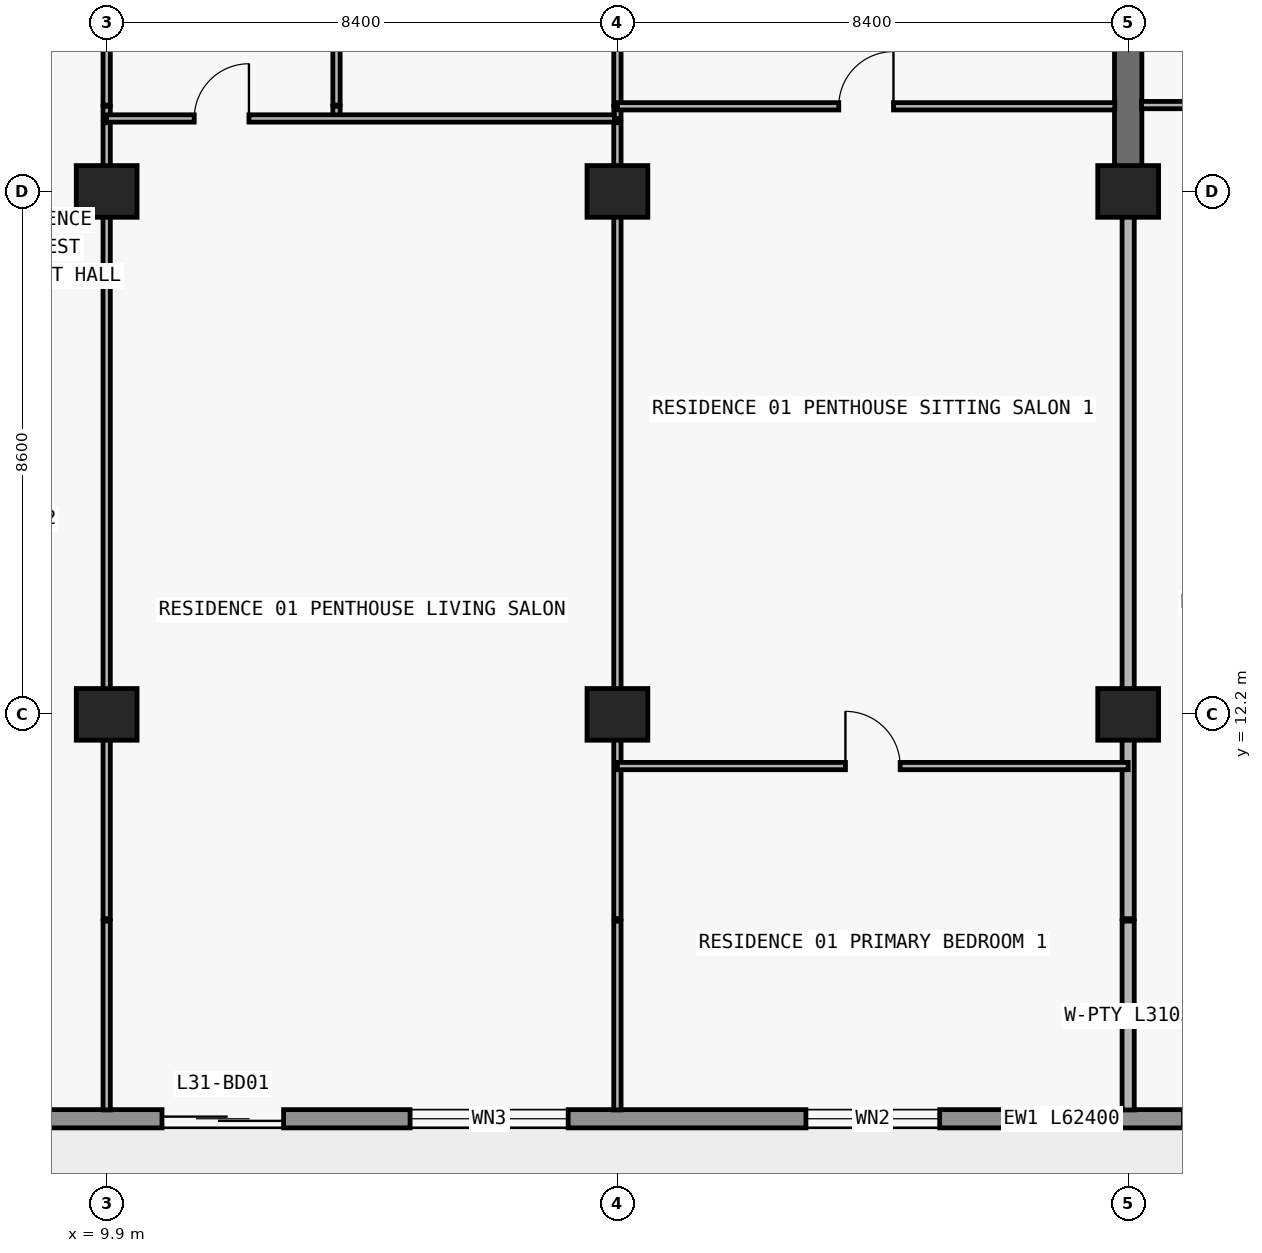
"""IFC4 building model, lengths in metres.
Left out: names, types, materials, properties, quantities, classifications, styles, units other than length and angle.
Written with IfcOpenShell. Run it as: python <this file> out.ifc"""

import sys

from ifc_helpers import new_model, si_unit, direction, frame, frame_2d, origin, origin_2d, place, context, subcontext, project, spatial, rectangle, extrude, element, fill, save


model = new_model("IFC4")
c1 = context("Model", 3, precision=1e-05, world=origin(), true_north=direction((0.0, 1.0)))
c2 = subcontext(c1, "Body", "Model", "MODEL_VIEW")
j1 = project(units=[si_unit("LENGTHUNIT", "METRE"), si_unit("PLANEANGLEUNIT", "RADIAN")], contexts=[c1])
p1 = place(None, origin())
s1 = spatial("IfcSite", under=j1, at=p1, CompositionType="ELEMENT")
p2 = place(p1, origin())
s2 = spatial("IfcBuilding", under=s1, at=p2, CompositionType="ELEMENT")
p3 = place(p2, frame((0.0, 0.0, 115.8)))
s3 = spatial("IfcBuildingStorey", under=s2, at=p3, CompositionType="ELEMENT", Elevation=115.8)
for number, where, z_axis, x_axis in (
    (1, (9.9, 12.2, 0.0), (0.0, 0.0, 1.0), (1.0, 0.0, 0.0)),
    (2, (18.3, 12.2, 0.0), (0.0, 0.0, 1.0), (1.0, 0.0, 0.0)),
    (3, (26.7, 12.2, 0.0), (0.0, 0.0, 1.0), (1.0, 0.0, 0.0)),
    (4, (9.9, 20.8, 0.0), (0.0, 0.0, 1.0), (1.0, 0.0, 0.0)),
    (5, (18.3, 20.8, 0.0), (0.0, 0.0, 1.0), (1.0, 0.0, 0.0)),
    (6, (26.7, 20.8, 0.0), (0.0, 0.0, 1.0), (1.0, 0.0, 0.0)),
):
    element("IfcColumn", number, at=place(p3, frame(where, z_axis=z_axis, x_axis=x_axis)), inside=s3, PredefinedType="COLUMN", context=c2, shape_type="SweptSolid", body=[
        extrude(rectangle(XDim=1.0, YDim=0.85, at=origin_2d()), origin(), (0.0, 0.0, 1.0), 3.05),
    ])
p4 = place(p3, frame((26.7, 20.8, 0.0), z_axis=(0.0, 0.0, 1.0), x_axis=(0.0, 1.0, 0.0)))
e7 = element("IfcWall", 7, at=p4, inside=s3, PredefinedType="SHEAR", context=c2, shape_type="SweptSolid", body=[
    extrude(rectangle(XDim=8.6, YDim=0.45, at=frame_2d((4.3, 0.0))), origin(), (0.0, 0.0, 1.0), 3.05),
])
p5 = place(p3, frame((70.1, 5.55, 0.0), z_axis=(0.0, 0.0, 1.0), x_axis=(-1.0, 0.0, 0.0)))
e8 = element("IfcWall", 8, at=p5, inside=s3, PredefinedType="STANDARD", context=c2, shape_type="SweptSolid", body=[
    extrude(rectangle(XDim=62.4, YDim=0.3, at=frame_2d((31.2, 0.0))), origin(), (0.0, 0.0, 1.0), 3.05),
])
p6 = place(p5, frame((57.29, 0.0, 0.0)))
e9 = element("IfcOpeningElement", 9, at=p6, cuts=e8, PredefinedType="OPENING", context=c2, shape_type="SweptSolid", body=[
    extrude(rectangle(XDim=2.0, YDim=2.3, at=frame_2d((1.0, 1.15))), frame((0.0, 0.16, 0.0), z_axis=(0.0, -1.0, 0.0), x_axis=(1.0, 0.0, 0.0)), (0.0, 0.0, 1.0), 0.32),
])
p7 = place(p5, frame((52.61, 0.0, 0.65)))
e10 = element("IfcOpeningElement", 10, at=p7, cuts=e8, PredefinedType="OPENING", context=c2, shape_type="SweptSolid", body=[
    extrude(rectangle(XDim=2.6, YDim=1.85, at=frame_2d((1.3, 0.925))), frame((0.0, 0.16, 0.0), z_axis=(0.0, -1.0, 0.0), x_axis=(1.0, 0.0, 0.0)), (0.0, 0.0, 1.0), 0.32),
])
p8 = place(p5, frame((46.5, 0.0, 0.85)))
e11 = element("IfcOpeningElement", 11, at=p8, cuts=e8, PredefinedType="OPENING", context=c2, shape_type="SweptSolid", body=[
    extrude(rectangle(XDim=2.2, YDim=1.55, at=frame_2d((1.1, 0.775))), frame((0.0, 0.16, 0.0), z_axis=(0.0, -1.0, 0.0), x_axis=(1.0, 0.0, 0.0)), (0.0, 0.0, 1.0), 0.32),
])
p9 = place(p5, frame((40.49, 0.0, 0.0)))
e12 = element("IfcOpeningElement", 12, at=p9, cuts=e8, PredefinedType="OPENING", context=c2, shape_type="SweptSolid", body=[
    extrude(rectangle(XDim=2.0, YDim=2.3, at=frame_2d((1.0, 1.15))), frame((0.0, 0.16, 0.0), z_axis=(0.0, -1.0, 0.0), x_axis=(1.0, 0.0, 0.0)), (0.0, 0.0, 1.0), 0.32),
])
p10 = place(p5, frame((35.81, 0.0, 0.65)))
e13 = element("IfcOpeningElement", 13, at=p10, cuts=e8, PredefinedType="OPENING", context=c2, shape_type="SweptSolid", body=[
    extrude(rectangle(XDim=2.6, YDim=1.85, at=frame_2d((1.3, 0.925))), frame((0.0, 0.16, 0.0), z_axis=(0.0, -1.0, 0.0), x_axis=(1.0, 0.0, 0.0)), (0.0, 0.0, 1.0), 0.32),
])
p11 = place(p5, frame((30.1, 0.0, 0.85)))
e14 = element("IfcOpeningElement", 14, at=p11, cuts=e8, PredefinedType="OPENING", context=c2, shape_type="SweptSolid", body=[
    extrude(rectangle(XDim=2.2, YDim=1.55, at=frame_2d((1.1, 0.775))), frame((0.0, 0.16, 0.0), z_axis=(0.0, -1.0, 0.0), x_axis=(1.0, 0.0, 0.0)), (0.0, 0.0, 1.0), 0.32),
])
p12 = place(p5, frame((24.426, 0.0, 0.0)))
e15 = element("IfcOpeningElement", 15, at=p12, cuts=e8, PredefinedType="OPENING", context=c2, shape_type="SweptSolid", body=[
    extrude(rectangle(XDim=2.0, YDim=2.3, at=frame_2d((1.0, 1.15))), frame((0.0, 0.16, 0.0), z_axis=(0.0, -1.0, 0.0), x_axis=(1.0, 0.0, 0.0)), (0.0, 0.0, 1.0), 0.32),
])
p13 = place(p5, frame((20.126, 0.0, 0.85)))
e16 = element("IfcOpeningElement", 16, at=p13, cuts=e8, PredefinedType="OPENING", context=c2, shape_type="SweptSolid", body=[
    extrude(rectangle(XDim=2.2, YDim=1.55, at=frame_2d((1.1, 0.775))), frame((0.0, 0.16, 0.0), z_axis=(0.0, -1.0, 0.0), x_axis=(1.0, 0.0, 0.0)), (0.0, 0.0, 1.0), 0.32),
])
p14 = place(p5, frame((15.69, 0.0, 0.0)))
e17 = element("IfcOpeningElement", 17, at=p14, cuts=e8, PredefinedType="OPENING", context=c2, shape_type="SweptSolid", body=[
    extrude(rectangle(XDim=2.0, YDim=2.3, at=frame_2d((1.0, 1.15))), frame((0.0, 0.16, 0.0), z_axis=(0.0, -1.0, 0.0), x_axis=(1.0, 0.0, 0.0)), (0.0, 0.0, 1.0), 0.32),
])
p15 = place(p5, frame((11.59, 0.0, 0.85)))
e18 = element("IfcOpeningElement", 18, at=p15, cuts=e8, PredefinedType="OPENING", context=c2, shape_type="SweptSolid", body=[
    extrude(rectangle(XDim=1.8, YDim=1.55, at=frame_2d((0.9, 0.775))), frame((0.0, 0.16, 0.0), z_axis=(0.0, -1.0, 0.0), x_axis=(1.0, 0.0, 0.0)), (0.0, 0.0, 1.0), 0.32),
])
p16 = place(p5, frame((7.626, 0.0, 0.0)))
e19 = element("IfcOpeningElement", 19, at=p16, cuts=e8, PredefinedType="OPENING", context=c2, shape_type="SweptSolid", body=[
    extrude(rectangle(XDim=2.0, YDim=2.3, at=frame_2d((1.0, 1.15))), frame((0.0, 0.16, 0.0), z_axis=(0.0, -1.0, 0.0), x_axis=(1.0, 0.0, 0.0)), (0.0, 0.0, 1.0), 0.32),
])
p17 = place(p5, frame((3.326, 0.0, 0.85)))
e20 = element("IfcOpeningElement", 20, at=p17, cuts=e8, PredefinedType="OPENING", context=c2, shape_type="SweptSolid", body=[
    extrude(rectangle(XDim=2.2, YDim=1.55, at=frame_2d((1.1, 0.775))), frame((0.0, 0.16, 0.0), z_axis=(0.0, -1.0, 0.0), x_axis=(1.0, 0.0, 0.0)), (0.0, 0.0, 1.0), 0.32),
])
p18 = place(p3, frame((9.9, 5.695, 0.0), z_axis=(0.0, 0.0, 1.0), x_axis=(0.0, 1.0, 0.0)))
e21 = element("IfcWall", 21, at=p18, inside=s3, PredefinedType="PARTITIONING", context=c2, shape_type="SweptSolid", body=[
    extrude(rectangle(XDim=3.105, YDim=0.12, at=frame_2d((1.552, 0.0))), origin(), (0.0, 0.0, 1.0), 3.05),
])
p19 = place(p3, frame((9.9, 8.84, 0.0), z_axis=(0.0, 0.0, 1.0), x_axis=(0.0, 1.0, 0.0)))
e22 = element("IfcWall", 22, at=p19, inside=s3, PredefinedType="PARTITIONING", context=c2, shape_type="SweptSolid", body=[
    extrude(rectangle(XDim=13.09, YDim=0.12, at=frame_2d((6.545, 0.0))), origin(), (0.0, 0.0, 1.0), 2.174),
])
p20 = place(p3, frame((9.9, 22.0, 0.0), z_axis=(0.0, 0.0, 1.0), x_axis=(0.0, 1.0, 0.0)))
e23 = element("IfcWall", 23, at=p20, inside=s3, PredefinedType="PARTITIONING", context=c2, shape_type="SweptSolid", body=[
    extrude(rectangle(XDim=0.2, YDim=0.12, at=frame_2d((0.1, 0.0))), origin(), (0.0, 0.0, 1.0), 2.174),
])
p21 = place(p3, frame((9.9, 22.22, 0.0), z_axis=(0.0, 0.0, 1.0), x_axis=(0.0, 1.0, 0.0)))
e24 = element("IfcWall", 24, at=p21, inside=s3, PredefinedType="PARTITIONING", context=c2, shape_type="SweptSolid", body=[
    extrude(rectangle(XDim=4.38, YDim=0.12, at=frame_2d((2.19, 0.0))), origin(), (0.0, 0.0, 1.0), 2.174),
])
p22 = place(p21, frame((1.74, 0.0, 0.0)))
e25 = element("IfcOpeningElement", 25, at=p22, cuts=e24, PredefinedType="OPENING", context=c2, shape_type="SweptSolid", body=[
    extrude(rectangle(XDim=0.9, YDim=2.124, at=frame_2d((0.45, 1.062))), frame((0.0, 0.07, 0.0), z_axis=(0.0, -1.0, 0.0), x_axis=(1.0, 0.0, 0.0)), (0.0, 0.0, 1.0), 0.14),
])
p23 = place(p3, frame((13.68, 22.0, 0.0), z_axis=(0.0, 0.0, 1.0), x_axis=(0.0, 1.0, 0.0)))
e26 = element("IfcWall", 26, at=p23, inside=s3, PredefinedType="PARTITIONING", context=c2, shape_type="SweptSolid", body=[
    extrude(rectangle(XDim=0.2, YDim=0.12, at=frame_2d((0.1, 0.0))), origin(), (0.0, 0.0, 1.0), 3.05),
])
p24 = place(p3, frame((13.68, 22.22, 0.0), z_axis=(0.0, 0.0, 1.0), x_axis=(0.0, 1.0, 0.0)))
e27 = element("IfcWall", 27, at=p24, inside=s3, PredefinedType="PARTITIONING", context=c2, shape_type="SweptSolid", body=[
    extrude(rectangle(XDim=4.38, YDim=0.12, at=frame_2d((2.19, 0.0))), origin(), (0.0, 0.0, 1.0), 3.05),
])
p25 = place(p24, frame((1.74, 0.0, 0.0)))
e28 = element("IfcOpeningElement", 28, at=p25, cuts=e27, PredefinedType="OPENING", context=c2, shape_type="SweptSolid", body=[
    extrude(rectangle(XDim=0.9, YDim=2.15, at=frame_2d((0.45, 1.075))), frame((0.0, 0.07, 0.0), z_axis=(0.0, -1.0, 0.0), x_axis=(1.0, 0.0, 0.0)), (0.0, 0.0, 1.0), 0.14),
])
p26 = place(p3, frame((18.3, 5.695, 0.0), z_axis=(0.0, 0.0, 1.0), x_axis=(0.0, 1.0, 0.0)))
e29 = element("IfcWall", 29, at=p26, inside=s3, PredefinedType="PARTITIONING", context=c2, shape_type="SweptSolid", body=[
    extrude(rectangle(XDim=3.105, YDim=0.12, at=frame_2d((1.552, 0.0))), origin(), (0.0, 0.0, 1.0), 3.05),
])
p27 = place(p3, frame((18.3, 8.84, 0.0), z_axis=(0.0, 0.0, 1.0), x_axis=(0.0, 1.0, 0.0)))
e30 = element("IfcWall", 30, at=p27, inside=s3, PredefinedType="PARTITIONING", context=c2, shape_type="SweptSolid", body=[
    extrude(rectangle(XDim=13.09, YDim=0.12, at=frame_2d((6.545, 0.0))), origin(), (0.0, 0.0, 1.0), 2.174),
])
p28 = place(p3, frame((18.3, 22.0, 0.0), z_axis=(0.0, 0.0, 1.0), x_axis=(0.0, 1.0, 0.0)))
e31 = element("IfcWall", 31, at=p28, inside=s3, PredefinedType="PARTITIONING", context=c2, shape_type="SweptSolid", body=[
    extrude(rectangle(XDim=0.2, YDim=0.12, at=frame_2d((0.1, 0.0))), origin(), (0.0, 0.0, 1.0), 2.174),
])
p29 = place(p3, frame((18.3, 22.22, 0.0), z_axis=(0.0, 0.0, 1.0), x_axis=(0.0, 1.0, 0.0)))
e32 = element("IfcWall", 32, at=p29, inside=s3, PredefinedType="PARTITIONING", context=c2, shape_type="SweptSolid", body=[
    extrude(rectangle(XDim=4.38, YDim=0.12, at=frame_2d((2.19, 0.0))), origin(), (0.0, 0.0, 1.0), 2.174),
])
p30 = place(p29, frame((1.74, 0.0, 0.0)))
e33 = element("IfcOpeningElement", 33, at=p30, cuts=e32, PredefinedType="OPENING", context=c2, shape_type="SweptSolid", body=[
    extrude(rectangle(XDim=0.9, YDim=2.124, at=frame_2d((0.45, 1.062))), frame((0.0, 0.07, 0.0), z_axis=(0.0, -1.0, 0.0), x_axis=(1.0, 0.0, 0.0)), (0.0, 0.0, 1.0), 0.14),
])
p31 = place(p3, frame((26.7, 5.695, 0.0), z_axis=(0.0, 0.0, 1.0), x_axis=(0.0, 1.0, 0.0)))
e34 = element("IfcWall", 34, at=p31, inside=s3, PredefinedType="PARTITIONING", context=c2, shape_type="SweptSolid", body=[
    extrude(rectangle(XDim=3.105, YDim=0.2, at=frame_2d((1.552, 0.0))), origin(), (0.0, 0.0, 1.0), 3.05),
])
p32 = place(p3, frame((26.7, 8.84, 0.0), z_axis=(0.0, 0.0, 1.0), x_axis=(0.0, 1.0, 0.0)))
e35 = element("IfcWall", 35, at=p32, inside=s3, PredefinedType="PARTITIONING", context=c2, shape_type="SweptSolid", body=[
    extrude(rectangle(XDim=11.955, YDim=0.2, at=frame_2d((5.978, 0.0))), origin(), (0.0, 0.0, 1.0), 2.174),
])
p33 = place(p3, frame((18.3, 11.35, 0.0), z_axis=(0.0, 0.0, 1.0), x_axis=(1.0, 0.0, 0.0)))
e36 = element("IfcWall", 36, at=p33, inside=s3, PredefinedType="PARTITIONING", context=c2, shape_type="SweptSolid", body=[
    extrude(rectangle(XDim=8.4, YDim=0.12, at=frame_2d((4.2, 0.0))), origin(), (0.0, 0.0, 1.0), 3.05),
])
p34 = place(p33, frame((3.75, 0.0, 0.0)))
e37 = element("IfcOpeningElement", 37, at=p34, cuts=e36, PredefinedType="OPENING", context=c2, shape_type="SweptSolid", body=[
    extrude(rectangle(XDim=0.9, YDim=2.15, at=frame_2d((0.45, 1.075))), frame((0.0, 0.07, 0.0), z_axis=(0.0, -1.0, 0.0), x_axis=(1.0, 0.0, 0.0)), (0.0, 0.0, 1.0), 0.14),
])
p35 = place(p3, frame((9.9, 22.0, 0.0), z_axis=(0.0, 0.0, 1.0), x_axis=(1.0, 0.0, 0.0)))
e38 = element("IfcWall", 38, at=p35, inside=s3, PredefinedType="PARTITIONING", context=c2, shape_type="SweptSolid", body=[
    extrude(rectangle(XDim=8.35, YDim=0.12, at=frame_2d((4.175, 0.0))), origin(), (0.0, 0.0, 1.0), 3.05),
])
p36 = place(p35, frame((1.44, 0.0, 0.0)))
e39 = element("IfcOpeningElement", 39, at=p36, cuts=e38, PredefinedType="OPENING", context=c2, shape_type="SweptSolid", body=[
    extrude(rectangle(XDim=0.9, YDim=2.15, at=frame_2d((0.45, 1.075))), frame((0.0, 0.07, 0.0), z_axis=(0.0, -1.0, 0.0), x_axis=(1.0, 0.0, 0.0)), (0.0, 0.0, 1.0), 0.14),
])
p37 = place(p3, frame((18.3, 22.2, 0.0), z_axis=(0.0, 0.0, 1.0), x_axis=(1.0, 0.0, 0.0)))
e40 = element("IfcWall", 40, at=p37, inside=s3, PredefinedType="PARTITIONING", context=c2, shape_type="SweptSolid", body=[
    extrude(rectangle(XDim=8.18, YDim=0.12, at=frame_2d((4.09, 0.0))), origin(), (0.0, 0.0, 1.0), 3.05),
])
p38 = place(p37, frame((3.64, 0.0, 0.0)))
e41 = element("IfcOpeningElement", 41, at=p38, cuts=e40, PredefinedType="OPENING", context=c2, shape_type="SweptSolid", body=[
    extrude(rectangle(XDim=0.9, YDim=2.15, at=frame_2d((0.45, 1.075))), frame((0.0, 0.07, 0.0), z_axis=(0.0, -1.0, 0.0), x_axis=(1.0, 0.0, 0.0)), (0.0, 0.0, 1.0), 0.14),
])
p39 = place(p3, frame((26.92, 22.22, 0.0), z_axis=(0.0, 0.0, 1.0), x_axis=(1.0, 0.0, 0.0)))
e42 = element("IfcWall", 42, at=p39, inside=s3, PredefinedType="PARTITIONING", context=c2, shape_type="SweptSolid", body=[
    extrude(rectangle(XDim=8.18, YDim=0.12, at=frame_2d((4.09, 0.0))), origin(), (0.0, 0.0, 1.0), 3.05),
])
p40 = place(p39, frame((1.204, 0.0, 0.0)))
e43 = element("IfcOpeningElement", 43, at=p40, cuts=e42, PredefinedType="OPENING", context=c2, shape_type="SweptSolid", body=[
    extrude(rectangle(XDim=0.9, YDim=2.15, at=frame_2d((0.45, 1.075))), frame((0.0, 0.07, 0.0), z_axis=(0.0, -1.0, 0.0), x_axis=(1.0, 0.0, 0.0)), (0.0, 0.0, 1.0), 0.14),
])
p41 = place(p6, origin())
e44 = element("IfcDoor", 44, at=p41, inside=s3, OperationType="DOUBLE_DOOR_SLIDING", PredefinedType="DOOR", context=c2, shape_type="SweptSolid", body=[
    extrude(rectangle(XDim=2.0, YDim=2.3, at=frame_2d((1.0, 1.15))), frame((0.0, 0.025, 0.0), z_axis=(0.0, -1.0, 0.0), x_axis=(1.0, 0.0, 0.0)), (0.0, 0.0, 1.0), 0.05),
])
fill(e9, e44)
p42 = place(p7, origin())
e45 = element("IfcWindow", 45, at=p42, inside=s3, PartitioningType="SINGLE_PANEL", PredefinedType="WINDOW", context=c2, shape_type="SweptSolid", body=[
    extrude(rectangle(XDim=2.6, YDim=1.85, at=frame_2d((1.3, 0.925))), frame((0.0, 0.03, 0.0), z_axis=(0.0, -1.0, 0.0), x_axis=(1.0, 0.0, 0.0)), (0.0, 0.0, 1.0), 0.06),
])
fill(e10, e45)
p43 = place(p8, origin())
e46 = element("IfcWindow", 46, at=p43, inside=s3, PartitioningType="SINGLE_PANEL", PredefinedType="WINDOW", context=c2, shape_type="SweptSolid", body=[
    extrude(rectangle(XDim=2.2, YDim=1.55, at=frame_2d((1.1, 0.775))), frame((0.0, 0.03, 0.0), z_axis=(0.0, -1.0, 0.0), x_axis=(1.0, 0.0, 0.0)), (0.0, 0.0, 1.0), 0.06),
])
fill(e11, e46)
p44 = place(p36, origin())
e47 = element("IfcDoor", 47, at=p44, inside=s3, OperationType="SINGLE_SWING_RIGHT", PredefinedType="DOOR", context=c2, shape_type="SweptSolid", body=[
    extrude(rectangle(XDim=0.9, YDim=2.15, at=frame_2d((0.45, 1.075))), frame((0.0, 0.025, 0.0), z_axis=(0.0, -1.0, 0.0), x_axis=(1.0, 0.0, 0.0)), (0.0, 0.0, 1.0), 0.05),
])
fill(e39, e47)
p45 = place(p38, origin())
e48 = element("IfcDoor", 48, at=p45, inside=s3, OperationType="SINGLE_SWING_RIGHT", PredefinedType="DOOR", context=c2, shape_type="SweptSolid", body=[
    extrude(rectangle(XDim=0.9, YDim=2.15, at=frame_2d((0.45, 1.075))), frame((0.0, 0.025, 0.0), z_axis=(0.0, -1.0, 0.0), x_axis=(1.0, 0.0, 0.0)), (0.0, 0.0, 1.0), 0.05),
])
fill(e41, e48)
p46 = place(p34, origin())
e49 = element("IfcDoor", 49, at=p46, inside=s3, OperationType="SINGLE_SWING_LEFT", PredefinedType="DOOR", context=c2, shape_type="SweptSolid", body=[
    extrude(rectangle(XDim=0.9, YDim=2.15, at=frame_2d((0.45, 1.075))), frame((0.0, 0.025, 0.0), z_axis=(0.0, -1.0, 0.0), x_axis=(1.0, 0.0, 0.0)), (0.0, 0.0, 1.0), 0.05),
])
fill(e37, e49)
save(model, sys.argv[1])
